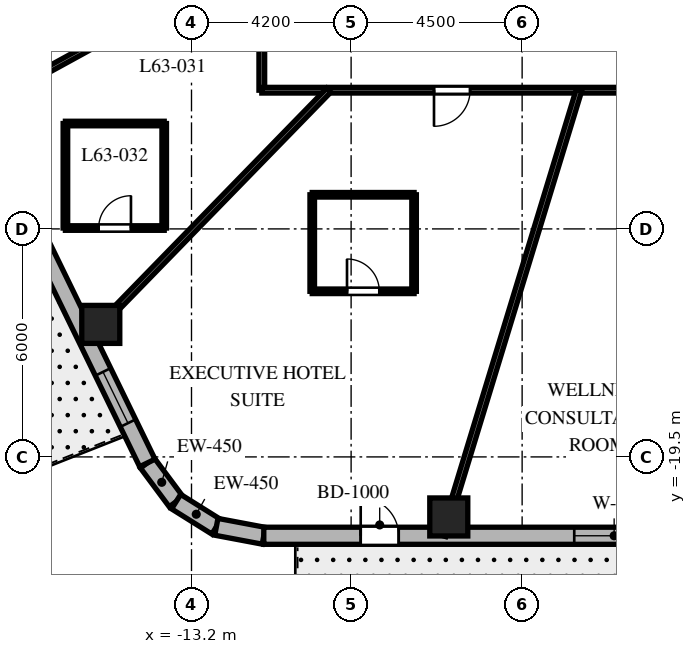
"""IFC4 building model, lengths in metres.
Left out: names, types, materials, properties, quantities, classifications, styles, units other than length and angle.
Written with IfcOpenShell. Run it as: python <this file> out.ifc"""

import sys

from ifc_helpers import new_model, si_unit, direction, frame, frame_2d, origin, origin_2d, place, context, subcontext, project, spatial, rectangle, extrude, element, fill, save


model = new_model("IFC4")
c1 = context("Model", 3, precision=1e-05, world=origin(), true_north=direction((0.0, 1.0)))
c2 = subcontext(c1, "Body", "Model", "MODEL_VIEW")
j1 = project(units=[si_unit("LENGTHUNIT", "METRE"), si_unit("PLANEANGLEUNIT", "RADIAN")], contexts=[c1])
p1 = place(None, origin())
s1 = spatial("IfcSite", under=j1, at=p1, CompositionType="ELEMENT")
p2 = place(p1, origin())
s2 = spatial("IfcBuilding", under=s1, at=p2, CompositionType="ELEMENT")
p3 = place(p2, frame((0.0, 0.0, 252.1)))
s3 = spatial("IfcBuildingStorey", under=s2, at=p3, CompositionType="ELEMENT", Elevation=252.1)
for number, where, z_axis, x_axis in (
    (1, (-6.43, -21.08, 0.0), (0.0, 0.0, 1.0), (1.0, 0.0, 0.0)),
    (2, (-15.587, -16.013, 0.0), (0.0, 0.0, 1.0), (1.0, 0.0, 0.0)),
):
    element("IfcColumn", number, at=place(p3, frame(where, z_axis=z_axis, x_axis=x_axis)), inside=s3, PredefinedType="COLUMN", context=c2, shape_type="SweptSolid", body=[
        extrude(rectangle(XDim=1.0, YDim=1.0, at=origin_2d()), origin(), (0.0, 0.0, 1.0), 3.8),
    ])
p4 = place(p3, frame((-14.362, -19.658, 0.0), z_axis=(0.0, 0.0, 1.0), x_axis=(0.596642462792, -0.80250717853, 0.0)))
e3 = element("IfcWall", 3, at=p4, inside=s3, PredefinedType="SOLIDWALL", context=c2, shape_type="SweptSolid", body=[
    extrude(rectangle(XDim=1.27, YDim=0.45, at=frame_2d((0.635, 0.0))), origin(), (0.0, 0.0, 1.0), 3.48),
])
p5 = place(p3, frame((-13.604, -20.678, 0.0), z_axis=(0.0, 0.0, 1.0), x_axis=(0.847910404124, -0.53013955387, 0.0)))
e4 = element("IfcWall", 4, at=p5, inside=s3, PredefinedType="SOLIDWALL", context=c2, shape_type="SweptSolid", body=[
    extrude(rectangle(XDim=1.249, YDim=0.45, at=frame_2d((0.624, 0.0))), origin(), (0.0, 0.0, 1.0), 3.48),
])
p6 = place(p3, frame((-12.546, -21.34, 0.0), z_axis=(0.0, 0.0, 1.0), x_axis=(0.982686750835, -0.18527479519, 0.0)))
e5 = element("IfcWall", 5, at=p6, inside=s3, PredefinedType="SOLIDWALL", context=c2, shape_type="SweptSolid", body=[
    extrude(rectangle(XDim=1.27, YDim=0.45, at=frame_2d((0.635, 0.0))), origin(), (0.0, 0.0, 1.0), 3.48),
])
p7 = place(p3, frame((-11.298, -21.575, 0.0), z_axis=(0.0, 0.0, 1.0), x_axis=(1.0, 0.0, 0.0)))
e6 = element("IfcWall", 6, at=p7, inside=s3, PredefinedType="SOLIDWALL", context=c2, shape_type="SweptSolid", body=[
    extrude(rectangle(XDim=24.399, YDim=0.45, at=frame_2d((12.2, 0.0))), origin(), (0.0, 0.0, 1.0), 3.48),
])
p8 = place(p7, frame((2.55, 0.0, 0.0)))
e7 = element("IfcOpeningElement", 7, at=p8, cuts=e6, PredefinedType="OPENING", context=c2, shape_type="SweptSolid", body=[
    extrude(rectangle(XDim=1.0, YDim=2.15, at=frame_2d((0.5, 1.075))), frame((0.0, 0.235, 0.0), z_axis=(0.0, -1.0, 0.0), x_axis=(1.0, 0.0, 0.0)), (0.0, 0.0, 1.0), 0.47),
])
p9 = place(p7, frame((8.169, 0.0, 0.8)))
e8 = element("IfcOpeningElement", 8, at=p9, cuts=e6, PredefinedType="OPENING", context=c2, shape_type="SweptSolid", body=[
    extrude(rectangle(XDim=2.1, YDim=1.85, at=frame_2d((1.05, 0.925))), frame((0.0, 0.235, 0.0), z_axis=(0.0, -1.0, 0.0), x_axis=(1.0, 0.0, 0.0)), (0.0, 0.0, 1.0), 0.47),
])
p10 = place(p7, frame((14.922, 0.0, 0.8)))
e9 = element("IfcOpeningElement", 9, at=p10, cuts=e6, PredefinedType="OPENING", context=c2, shape_type="SweptSolid", body=[
    extrude(rectangle(XDim=2.1, YDim=1.85, at=frame_2d((1.05, 0.925))), frame((0.0, 0.235, 0.0), z_axis=(0.0, -1.0, 0.0), x_axis=(1.0, 0.0, 0.0)), (0.0, 0.0, 1.0), 0.47),
])
p11 = place(p7, frame((20.996, 0.0, 0.8)))
e10 = element("IfcOpeningElement", 10, at=p11, cuts=e6, PredefinedType="OPENING", context=c2, shape_type="SweptSolid", body=[
    extrude(rectangle(XDim=2.1, YDim=1.85, at=frame_2d((1.05, 0.925))), frame((0.0, 0.235, 0.0), z_axis=(0.0, -1.0, 0.0), x_axis=(1.0, 0.0, 0.0)), (0.0, 0.0, 1.0), 0.47),
])
p12 = place(p3, frame((-22.74, -2.452, 0.0), z_axis=(0.0, 0.0, 1.0), x_axis=(0.437753424814, -0.899095066755, 0.0)))
e11 = element("IfcWall", 11, at=p12, inside=s3, PredefinedType="SOLIDWALL", context=c2, shape_type="SweptSolid", body=[
    extrude(rectangle(XDim=19.137, YDim=0.45, at=frame_2d((9.569, 0.0))), origin(), (0.0, 0.0, 1.0), 3.48),
])
p13 = place(p12, frame((4.763, 0.0, 0.0)))
e12 = element("IfcOpeningElement", 12, at=p13, cuts=e11, PredefinedType="OPENING", context=c2, shape_type="SweptSolid", body=[
    extrude(rectangle(XDim=0.95, YDim=2.15, at=frame_2d((0.475, 1.075))), frame((0.0, 0.235, 0.0), z_axis=(0.0, -1.0, 0.0), x_axis=(1.0, 0.0, 0.0)), (0.0, 0.0, 1.0), 0.47),
])
p14 = place(p12, frame((1.216, 0.0, 0.8)))
e13 = element("IfcOpeningElement", 13, at=p14, cuts=e11, PredefinedType="OPENING", context=c2, shape_type="SweptSolid", body=[
    extrude(rectangle(XDim=1.5, YDim=1.8, at=frame_2d((0.75, 0.9))), frame((0.0, 0.235, 0.0), z_axis=(0.0, -1.0, 0.0), x_axis=(1.0, 0.0, 0.0)), (0.0, 0.0, 1.0), 0.47),
])
p15 = place(p12, frame((6.461, 0.0, 0.8)))
e14 = element("IfcOpeningElement", 14, at=p15, cuts=e11, PredefinedType="OPENING", context=c2, shape_type="SweptSolid", body=[
    extrude(rectangle(XDim=1.5, YDim=1.8, at=frame_2d((0.75, 0.9))), frame((0.0, 0.235, 0.0), z_axis=(0.0, -1.0, 0.0), x_axis=(1.0, 0.0, 0.0)), (0.0, 0.0, 1.0), 0.47),
])
p16 = place(p12, frame((11.156, 0.0, 0.8)))
e15 = element("IfcOpeningElement", 15, at=p16, cuts=e11, PredefinedType="OPENING", context=c2, shape_type="SweptSolid", body=[
    extrude(rectangle(XDim=1.5, YDim=1.8, at=frame_2d((0.75, 0.9))), frame((0.0, 0.235, 0.0), z_axis=(0.0, -1.0, 0.0), x_axis=(1.0, 0.0, 0.0)), (0.0, 0.0, 1.0), 0.47),
])
p17 = place(p12, frame((16.473, 0.0, 0.8)))
e16 = element("IfcOpeningElement", 16, at=p17, cuts=e11, PredefinedType="OPENING", context=c2, shape_type="SweptSolid", body=[
    extrude(rectangle(XDim=1.5, YDim=1.8, at=frame_2d((0.75, 0.9))), frame((0.0, 0.235, 0.0), z_axis=(0.0, -1.0, 0.0), x_axis=(1.0, 0.0, 0.0)), (0.0, 0.0, 1.0), 0.47),
])
p18 = place(p3, frame((-11.35, -9.85, 0.0), z_axis=(0.0, 0.0, 1.0), x_axis=(0.0, 1.0, 0.0)))
e17 = element("IfcWall", 17, at=p18, inside=s3, PredefinedType="PARTITIONING", context=c2, shape_type="SweptSolid", body=[
    extrude(rectangle(XDim=12.4, YDim=0.15, at=frame_2d((6.2, 0.0))), origin(), (0.0, 0.0, 1.0), 2.97),
])
p19 = place(p18, frame((8.835, 0.0, 0.0)))
e18 = element("IfcOpeningElement", 18, at=p19, cuts=e17, PredefinedType="OPENING", context=c2, shape_type="SweptSolid", body=[
    extrude(rectangle(XDim=0.95, YDim=2.03, at=frame_2d((0.475, 1.015))), frame((0.0, 0.085, 0.0), z_axis=(0.0, -1.0, 0.0), x_axis=(1.0, 0.0, 0.0)), (0.0, 0.0, 1.0), 0.17),
])
p20 = place(p18, frame((4.709, 0.0, 0.0)))
e19 = element("IfcOpeningElement", 19, at=p20, cuts=e17, PredefinedType="OPENING", context=c2, shape_type="SweptSolid", body=[
    extrude(rectangle(XDim=0.9, YDim=2.03, at=frame_2d((0.45, 1.015))), frame((0.0, 0.085, 0.0), z_axis=(0.0, -1.0, 0.0), x_axis=(1.0, 0.0, 0.0)), (0.0, 0.0, 1.0), 0.17),
])
p21 = place(p18, frame((1.457, 0.0, 0.0)))
e20 = element("IfcOpeningElement", 20, at=p21, cuts=e17, PredefinedType="OPENING", context=c2, shape_type="SweptSolid", body=[
    extrude(rectangle(XDim=0.95, YDim=2.03, at=frame_2d((0.475, 1.015))), frame((0.0, 0.085, 0.0), z_axis=(0.0, -1.0, 0.0), x_axis=(1.0, 0.0, 0.0)), (0.0, 0.0, 1.0), 0.17),
])
p22 = place(p3, frame((-0.92, -9.85, 0.0), z_axis=(0.0, 0.0, 1.0), x_axis=(-1.0, 0.0, 0.0)))
e21 = element("IfcWall", 21, at=p22, inside=s3, PredefinedType="PARTITIONING", context=c2, shape_type="SweptSolid", body=[
    extrude(rectangle(XDim=10.43, YDim=0.15, at=frame_2d((5.215, 0.0))), origin(), (0.0, 0.0, 1.0), 2.97),
])
p23 = place(p22, frame((4.949, 0.0, 0.0)))
e22 = element("IfcOpeningElement", 22, at=p23, cuts=e21, PredefinedType="OPENING", context=c2, shape_type="SweptSolid", body=[
    extrude(rectangle(XDim=0.95, YDim=2.03, at=frame_2d((0.475, 1.015))), frame((0.0, 0.085, 0.0), z_axis=(0.0, -1.0, 0.0), x_axis=(1.0, 0.0, 0.0)), (0.0, 0.0, 1.0), 0.17),
])
p24 = place(p3, frame((-11.35, -6.227, 0.0), z_axis=(0.0, 0.0, 1.0), x_axis=(-0.876723190824, -0.480995266786, 0.0)))
e23 = element("IfcWall", 23, at=p24, inside=s3, PredefinedType="PARTITIONING", context=c2, shape_type="SweptSolid", body=[
    extrude(rectangle(XDim=8.598, YDim=0.15, at=frame_2d((4.299, 0.0))), origin(), (0.0, 0.0, 1.0), 2.72),
])
p25 = place(p3, frame((-9.588, -9.85, 0.0), z_axis=(0.0, 0.0, 1.0), x_axis=(-0.697519469595, -0.716565830567, 0.0)))
e24 = element("IfcWall", 24, at=p25, inside=s3, PredefinedType="PARTITIONING", context=c2, shape_type="SweptSolid", body=[
    extrude(rectangle(XDim=9.126, YDim=0.15, at=frame_2d((4.563, 0.0))), origin(), (0.0, 0.0, 1.0), 2.72),
])
p26 = place(p3, frame((-3.004, -9.85, 0.0), z_axis=(0.0, 0.0, 1.0), x_axis=(-0.291775760688, -0.956486751333, 0.0)))
e25 = element("IfcWall", 25, at=p26, inside=s3, PredefinedType="PARTITIONING", context=c2, shape_type="SweptSolid", body=[
    extrude(rectangle(XDim=12.258, YDim=0.15, at=frame_2d((6.129, 0.0))), origin(), (0.0, 0.0, 1.0), 2.72),
])
p27 = place(p3, frame((-16.518, -13.477, 0.0), z_axis=(0.0, 0.0, 1.0), x_axis=(1.0, 0.0, 0.0)))
e26 = element("IfcWall", 26, at=p27, inside=s3, PredefinedType="PARTITIONING", context=c2, shape_type="SweptSolid", body=[
    extrude(rectangle(XDim=2.6, YDim=0.12, at=frame_2d((1.3, 0.0))), origin(), (0.0, 0.0, 1.0), 3.48),
])
p28 = place(p27, frame((0.875, 0.0, 0.0)))
e27 = element("IfcOpeningElement", 27, at=p28, cuts=e26, PredefinedType="OPENING", context=c2, shape_type="SweptSolid", body=[
    extrude(rectangle(XDim=0.85, YDim=2.03, at=frame_2d((0.425, 1.015))), frame((0.0, 0.07, 0.0), z_axis=(0.0, -1.0, 0.0), x_axis=(1.0, 0.0, 0.0)), (0.0, 0.0, 1.0), 0.14),
])
p29 = place(p3, frame((-13.918, -13.477, 0.0), z_axis=(0.0, 0.0, 1.0), x_axis=(0.0, 1.0, 0.0)))
e28 = element("IfcWall", 28, at=p29, inside=s3, PredefinedType="PARTITIONING", context=c2, shape_type="SweptSolid", body=[
    extrude(rectangle(XDim=2.75, YDim=0.12, at=frame_2d((1.375, 0.0))), origin(), (0.0, 0.0, 1.0), 3.006),
])
p30 = place(p3, frame((-13.918, -10.727, 0.0), z_axis=(0.0, 0.0, 1.0), x_axis=(-1.0, 0.0, 0.0)))
e29 = element("IfcWall", 29, at=p30, inside=s3, PredefinedType="PARTITIONING", context=c2, shape_type="SweptSolid", body=[
    extrude(rectangle(XDim=2.6, YDim=0.12, at=frame_2d((1.3, 0.0))), origin(), (0.0, 0.0, 1.0), 3.006),
])
p31 = place(p3, frame((-16.518, -10.727, 0.0), z_axis=(0.0, 0.0, 1.0), x_axis=(0.0, -1.0, 0.0)))
e30 = element("IfcWall", 30, at=p31, inside=s3, PredefinedType="PARTITIONING", context=c2, shape_type="SweptSolid", body=[
    extrude(rectangle(XDim=2.75, YDim=0.12, at=frame_2d((1.375, 0.0))), origin(), (0.0, 0.0, 1.0), 3.48),
])
p32 = place(p3, frame((-10.023, -15.142, 0.0), z_axis=(0.0, 0.0, 1.0), x_axis=(1.0, 0.0, 0.0)))
e31 = element("IfcWall", 31, at=p32, inside=s3, PredefinedType="PARTITIONING", context=c2, shape_type="SweptSolid", body=[
    extrude(rectangle(XDim=2.68, YDim=0.12, at=frame_2d((1.34, 0.0))), origin(), (0.0, 0.0, 1.0), 3.052),
])
p33 = place(p32, frame((0.915, 0.0, 0.0)))
e32 = element("IfcOpeningElement", 32, at=p33, cuts=e31, PredefinedType="OPENING", context=c2, shape_type="SweptSolid", body=[
    extrude(rectangle(XDim=0.85, YDim=2.03, at=frame_2d((0.425, 1.015))), frame((0.0, 0.07, 0.0), z_axis=(0.0, -1.0, 0.0), x_axis=(1.0, 0.0, 0.0)), (0.0, 0.0, 1.0), 0.14),
])
p34 = place(p3, frame((-7.343, -15.142, 0.0), z_axis=(0.0, 0.0, 1.0), x_axis=(0.0, 1.0, 0.0)))
e33 = element("IfcWall", 33, at=p34, inside=s3, PredefinedType="PARTITIONING", context=c2, shape_type="SweptSolid", body=[
    extrude(rectangle(XDim=2.54, YDim=0.12, at=frame_2d((1.27, 0.0))), origin(), (0.0, 0.0, 1.0), 2.92),
])
p35 = place(p3, frame((-7.343, -12.602, 0.0), z_axis=(0.0, 0.0, 1.0), x_axis=(-1.0, 0.0, 0.0)))
e34 = element("IfcWall", 34, at=p35, inside=s3, PredefinedType="PARTITIONING", context=c2, shape_type="SweptSolid", body=[
    extrude(rectangle(XDim=2.68, YDim=0.12, at=frame_2d((1.34, 0.0))), origin(), (0.0, 0.0, 1.0), 2.92),
])
p36 = place(p3, frame((-10.023, -12.602, 0.0), z_axis=(0.0, 0.0, 1.0), x_axis=(0.0, -1.0, 0.0)))
e35 = element("IfcWall", 35, at=p36, inside=s3, PredefinedType="PARTITIONING", context=c2, shape_type="SweptSolid", body=[
    extrude(rectangle(XDim=2.54, YDim=0.12, at=frame_2d((1.27, 0.0))), origin(), (0.0, 0.0, 1.0), 3.052),
])
p37 = place(p8, origin())
e36 = element("IfcDoor", 36, at=p37, inside=s3, OperationType="SINGLE_SWING_LEFT", PredefinedType="DOOR", context=c2, shape_type="SweptSolid", body=[
    extrude(rectangle(XDim=1.0, YDim=2.15, at=frame_2d((0.5, 1.075))), frame((0.0, 0.025, 0.0), z_axis=(0.0, -1.0, 0.0), x_axis=(1.0, 0.0, 0.0)), (0.0, 0.0, 1.0), 0.05),
])
fill(e7, e36)
p38 = place(p9, origin())
e37 = element("IfcWindow", 37, at=p38, inside=s3, PartitioningType="SINGLE_PANEL", PredefinedType="WINDOW", context=c2, shape_type="SweptSolid", body=[
    extrude(rectangle(XDim=2.1, YDim=1.85, at=frame_2d((1.05, 0.925))), frame((0.0, 0.03, 0.0), z_axis=(0.0, -1.0, 0.0), x_axis=(1.0, 0.0, 0.0)), (0.0, 0.0, 1.0), 0.06),
])
fill(e8, e37)
p39 = place(p17, origin())
e38 = element("IfcWindow", 38, at=p39, inside=s3, PartitioningType="SINGLE_PANEL", PredefinedType="WINDOW", context=c2, shape_type="SweptSolid", body=[
    extrude(rectangle(XDim=1.5, YDim=1.8, at=frame_2d((0.75, 0.9))), frame((0.0, 0.03, 0.0), z_axis=(0.0, -1.0, 0.0), x_axis=(1.0, 0.0, 0.0)), (0.0, 0.0, 1.0), 0.06),
])
fill(e16, e38)
p40 = place(p28, origin())
e39 = element("IfcDoor", 39, at=p40, inside=s3, OperationType="SINGLE_SWING_RIGHT", PredefinedType="DOOR", context=c2, shape_type="SweptSolid", body=[
    extrude(rectangle(XDim=0.85, YDim=2.03, at=frame_2d((0.425, 1.015))), frame((0.0, 0.025, 0.0), z_axis=(0.0, -1.0, 0.0), x_axis=(1.0, 0.0, 0.0)), (0.0, 0.0, 1.0), 0.05),
])
fill(e27, e39)
p41 = place(p23, origin())
e40 = element("IfcDoor", 40, at=p41, inside=s3, OperationType="SINGLE_SWING_RIGHT", PredefinedType="DOOR", context=c2, shape_type="SweptSolid", body=[
    extrude(rectangle(XDim=0.95, YDim=2.03, at=frame_2d((0.475, 1.015))), frame((0.0, 0.025, 0.0), z_axis=(0.0, -1.0, 0.0), x_axis=(1.0, 0.0, 0.0)), (0.0, 0.0, 1.0), 0.05),
])
fill(e22, e40)
p42 = place(p33, origin())
e41 = element("IfcDoor", 41, at=p42, inside=s3, OperationType="SINGLE_SWING_LEFT", PredefinedType="DOOR", context=c2, shape_type="SweptSolid", body=[
    extrude(rectangle(XDim=0.85, YDim=2.03, at=frame_2d((0.425, 1.015))), frame((0.0, 0.025, 0.0), z_axis=(0.0, -1.0, 0.0), x_axis=(1.0, 0.0, 0.0)), (0.0, 0.0, 1.0), 0.05),
])
fill(e32, e41)
save(model, sys.argv[1])
